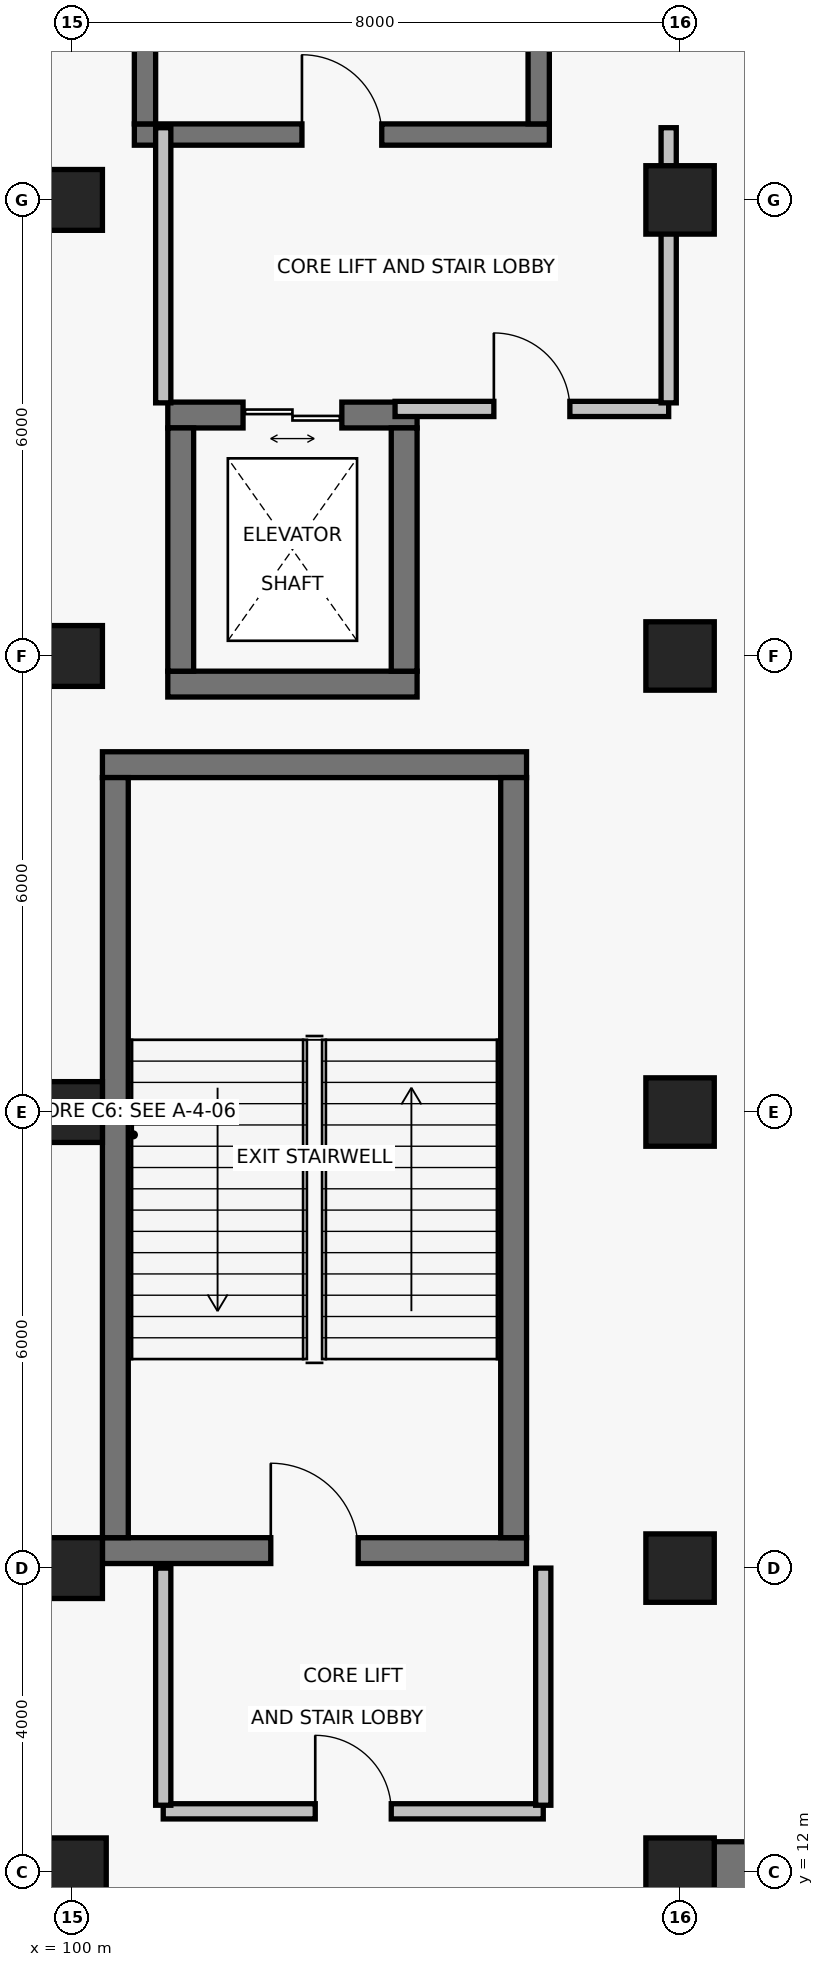
"""IFC4 building model, lengths in metres.
Left out: names, types, materials, properties, quantities, classifications, styles, units other than length and angle.
Written with IfcOpenShell. Run it as: python <this file> out.ifc"""

import sys

from ifc_helpers import new_model, si_unit, direction, frame, frame_2d, origin, origin_2d, place, context, subcontext, project, spatial, rectangle, extrude, element, fill, save


model = new_model("IFC4")
c1 = context("Model", 3, precision=1e-05, world=origin(), true_north=direction((0.0, 1.0)))
c2 = subcontext(c1, "Body", "Model", "MODEL_VIEW")
j1 = project(units=[si_unit("LENGTHUNIT", "METRE"), si_unit("PLANEANGLEUNIT", "RADIAN")], contexts=[c1])
p1 = place(None, origin())
s1 = spatial("IfcSite", under=j1, at=p1, CompositionType="ELEMENT")
p2 = place(p1, origin())
s2 = spatial("IfcBuilding", under=s1, at=p2, CompositionType="ELEMENT")
p3 = place(p2, frame((0.0, 0.0, -10.4)))
s3 = spatial("IfcBuildingStorey", under=s2, at=p3, CompositionType="ELEMENT", Elevation=-10.4)
p4 = place(p3, frame((100.0, 12.0, 0.0), z_axis=(0.0, 0.0, 1.0), x_axis=(1.0, 0.0, 0.0)))
e1 = element("IfcColumn", 1, at=p4, inside=s3, PredefinedType="COLUMN", context=c2, shape_type="SweptSolid", body=[
    extrude(rectangle(XDim=0.9, YDim=0.9, at=origin_2d()), origin(), (0.0, 0.0, 1.0), 5.6),
])
for number, where, z_axis, x_axis in (
    (2, (100.0, 16.0, 0.0), (0.0, 0.0, 1.0), (1.0, 0.0, 0.0)),
    (3, (100.0, 22.0, 0.0), (0.0, 0.0, 1.0), (1.0, 0.0, 0.0)),
    (4, (100.0, 28.0, 0.0), (0.0, 0.0, 1.0), (1.0, 0.0, 0.0)),
    (5, (100.0, 34.0, 0.0), (0.0, 0.0, 1.0), (1.0, 0.0, 0.0)),
):
    element("IfcColumn", number, at=place(p3, frame(where, z_axis=z_axis, x_axis=x_axis)), inside=s3, PredefinedType="COLUMN", context=c2, shape_type="SweptSolid", body=[
        extrude(rectangle(XDim=0.8, YDim=0.8, at=origin_2d()), origin(), (0.0, 0.0, 1.0), 5.6),
    ])
for number, where, z_axis, x_axis in (
    (6, (108.0, 12.0, 0.0), (0.0, 0.0, 1.0), (1.0, 0.0, 0.0)),
    (7, (108.0, 16.0, 0.0), (0.0, 0.0, 1.0), (1.0, 0.0, 0.0)),
    (8, (108.0, 22.0, 0.0), (0.0, 0.0, 1.0), (1.0, 0.0, 0.0)),
    (9, (108.0, 28.0, 0.0), (0.0, 0.0, 1.0), (1.0, 0.0, 0.0)),
    (10, (108.0, 34.0, 0.0), (0.0, 0.0, 1.0), (1.0, 0.0, 0.0)),
):
    element("IfcColumn", number, at=place(p3, frame(where, z_axis=z_axis, x_axis=x_axis)), inside=s3, PredefinedType="COLUMN", context=c2, shape_type="SweptSolid", body=[
        extrude(rectangle(XDim=0.9, YDim=0.9, at=origin_2d()), origin(), (0.0, 0.0, 1.0), 5.6),
    ])
p5 = place(p3, frame((108.0, 0.0, 0.0), z_axis=(0.0, 0.0, 1.0), x_axis=(0.0, 1.0, 0.0)))
e11 = element("IfcWall", 11, at=p5, inside=s3, PredefinedType="USERDEFINED", context=c2, shape_type="SweptSolid", body=[
    extrude(rectangle(XDim=12.0, YDim=0.8, at=frame_2d((6.0, 0.0))), origin(), (0.0, 0.0, 1.0), 5.15),
])
p6 = place(p3, frame((108.0, 12.0, 0.0), z_axis=(0.0, 0.0, 1.0), x_axis=(1.0, 0.0, 0.0)))
e12 = element("IfcWall", 12, at=p6, inside=s3, PredefinedType="USERDEFINED", context=c2, shape_type="SweptSolid", body=[
    extrude(rectangle(XDim=30.0, YDim=0.8, at=frame_2d((15.0, 0.0))), origin(), (0.0, 0.0, 1.0), 5.15),
])
p7 = place(p3, frame((100.4, 16.23, 0.0), z_axis=(0.0, 0.0, 1.0), x_axis=(1.0, 0.0, 0.0)))
e13 = element("IfcWall", 13, at=p7, inside=s3, PredefinedType="SHEAR", context=c2, shape_type="SweptSolid", body=[
    extrude(rectangle(XDim=5.58, YDim=0.34, at=frame_2d((2.79, 0.0))), origin(), (0.0, 0.0, 1.0), 5.15),
])
p8 = place(p7, frame((2.215, 0.0, 0.0)))
e14 = element("IfcOpeningElement", 14, at=p8, cuts=e13, PredefinedType="OPENING", context=c2, shape_type="SweptSolid", body=[
    extrude(rectangle(XDim=1.15, YDim=2.15, at=frame_2d((0.575, 1.075))), frame((0.0, 0.185, 0.0), z_axis=(0.0, -1.0, 0.0), x_axis=(1.0, 0.0, 0.0)), (0.0, 0.0, 1.0), 0.37),
])
p9 = place(p3, frame((105.98, 26.57, 0.0), z_axis=(0.0, 0.0, 1.0), x_axis=(-1.0, 0.0, 0.0)))
e15 = element("IfcWall", 15, at=p9, inside=s3, PredefinedType="SHEAR", context=c2, shape_type="SweptSolid", body=[
    extrude(rectangle(XDim=5.58, YDim=0.34, at=frame_2d((2.79, 0.0))), origin(), (0.0, 0.0, 1.0), 5.15),
])
for number, where, z_axis, x_axis in (
    (16, (100.57, 26.4, 0.0), (0.0, 0.0, 1.0), (0.0, -1.0, 0.0)),
    (17, (105.81, 16.4, 0.0), (0.0, 0.0, 1.0), (0.0, 1.0, 0.0)),
):
    element("IfcWall", number, at=place(p3, frame(where, z_axis=z_axis, x_axis=x_axis)), inside=s3, PredefinedType="SHEAR", context=c2, shape_type="SweptSolid", body=[
        extrude(rectangle(XDim=10.0, YDim=0.34, at=frame_2d((5.0, 0.0))), origin(), (0.0, 0.0, 1.0), 5.15),
    ])
p10 = place(p3, frame((101.2, 12.8, 0.0), z_axis=(0.0, 0.0, 1.0), x_axis=(1.0, 0.0, 0.0)))
e18 = element("IfcWall", 18, at=p10, inside=s3, PredefinedType="PARTITIONING", context=c2, shape_type="SweptSolid", body=[
    extrude(rectangle(XDim=5.0, YDim=0.2, at=frame_2d((2.5, 0.0))), origin(), (0.0, 0.0, 1.0), 4.883),
])
p11 = place(p10, frame((2.0, 0.0, 0.0)))
e19 = element("IfcOpeningElement", 19, at=p11, cuts=e18, PredefinedType="OPENING", context=c2, shape_type="SweptSolid", body=[
    extrude(rectangle(XDim=1.0, YDim=2.15, at=frame_2d((0.5, 1.075))), frame((0.0, 0.115, 0.0), z_axis=(0.0, -1.0, 0.0), x_axis=(1.0, 0.0, 0.0)), (0.0, 0.0, 1.0), 0.23),
])
for number, where, z_axis, x_axis in (
    (20, (101.2, 16.0, 0.0), (0.0, 0.0, 1.0), (0.0, -1.0, 0.0)),
    (21, (106.2, 12.88, 0.0), (0.0, 0.0, 1.0), (0.0, 1.0, 0.0)),
):
    element("IfcWall", number, at=place(p3, frame(where, z_axis=z_axis, x_axis=x_axis)), inside=s3, PredefinedType="PARTITIONING", context=c2, shape_type="SweptSolid", body=[
        extrude(rectangle(XDim=3.12, YDim=0.2, at=frame_2d((1.56, 0.0))), origin(), (0.0, 0.0, 1.0), 4.48),
    ])
p12 = place(p3, frame((100.82, 34.86, 0.0), z_axis=(0.0, 0.0, 1.0), x_axis=(1.0, 0.0, 0.0)))
e22 = element("IfcWall", 22, at=p12, inside=s3, PredefinedType="SHEAR", context=c2, shape_type="SweptSolid", body=[
    extrude(rectangle(XDim=5.46, YDim=0.28, at=frame_2d((2.73, 0.0))), origin(), (0.0, 0.0, 1.0), 5.15),
])
p13 = place(p12, frame((2.205, 0.0, 0.0)))
e23 = element("IfcOpeningElement", 23, at=p13, cuts=e22, PredefinedType="OPENING", context=c2, shape_type="SweptSolid", body=[
    extrude(rectangle(XDim=1.05, YDim=2.15, at=frame_2d((0.525, 1.075))), frame((0.0, 0.155, 0.0), z_axis=(0.0, -1.0, 0.0), x_axis=(1.0, 0.0, 0.0)), (0.0, 0.0, 1.0), 0.31),
])
for number, where, z_axis, x_axis in (
    (24, (100.96, 45.0, 0.0), (0.0, 0.0, 1.0), (0.0, -1.0, 0.0)),
    (25, (106.14, 35.0, 0.0), (0.0, 0.0, 1.0), (0.0, 1.0, 0.0)),
):
    element("IfcWall", number, at=place(p3, frame(where, z_axis=z_axis, x_axis=x_axis)), inside=s3, PredefinedType="SHEAR", context=c2, shape_type="SweptSolid", body=[
        extrude(rectangle(XDim=10.0, YDim=0.28, at=frame_2d((5.0, 0.0))), origin(), (0.0, 0.0, 1.0), 5.15),
    ])
p14 = place(p3, frame((101.26, 27.63, 0.0), z_axis=(0.0, 0.0, 1.0), x_axis=(1.0, 0.0, 0.0)))
e26 = element("IfcWall", 26, at=p14, inside=s3, PredefinedType="SHEAR", context=c2, shape_type="SweptSolid", body=[
    extrude(rectangle(XDim=3.28, YDim=0.34, at=frame_2d((1.64, 0.0))), origin(), (0.0, 0.0, 1.0), 5.15),
])
p15 = place(p3, frame((104.54, 31.17, 0.0), z_axis=(0.0, 0.0, 1.0), x_axis=(-1.0, 0.0, 0.0)))
e27 = element("IfcWall", 27, at=p15, inside=s3, PredefinedType="SHEAR", context=c2, shape_type="SweptSolid", body=[
    extrude(rectangle(XDim=3.28, YDim=0.34, at=frame_2d((1.64, 0.0))), origin(), (0.0, 0.0, 1.0), 5.15),
])
p16 = place(p15, frame((0.99, 0.0, 0.0)))
e28 = element("IfcOpeningElement", 28, at=p16, cuts=e27, PredefinedType="OPENING", context=c2, shape_type="SweptSolid", body=[
    extrude(rectangle(XDim=1.3, YDim=2.25, at=frame_2d((0.65, 1.125))), frame((0.0, 0.185, 0.0), z_axis=(0.0, -1.0, 0.0), x_axis=(1.0, 0.0, 0.0)), (0.0, 0.0, 1.0), 0.37),
])
for number, where, z_axis, x_axis in (
    (29, (101.43, 31.0, 0.0), (0.0, 0.0, 1.0), (0.0, -1.0, 0.0)),
    (30, (104.37, 27.8, 0.0), (0.0, 0.0, 1.0), (0.0, 1.0, 0.0)),
):
    element("IfcWall", number, at=place(p3, frame(where, z_axis=z_axis, x_axis=x_axis)), inside=s3, PredefinedType="SHEAR", context=c2, shape_type="SweptSolid", body=[
        extrude(rectangle(XDim=3.2, YDim=0.34, at=frame_2d((1.6, 0.0))), origin(), (0.0, 0.0, 1.0), 5.15),
    ])
p17 = place(p3, frame((104.25, 31.25, 0.0), z_axis=(0.0, 0.0, 1.0), x_axis=(1.0, 0.0, 0.0)))
e31 = element("IfcWall", 31, at=p17, inside=s3, PredefinedType="PARTITIONING", context=c2, shape_type="SweptSolid", body=[
    extrude(rectangle(XDim=3.6, YDim=0.2, at=frame_2d((1.8, 0.0))), origin(), (0.0, 0.0, 1.0), 4.68),
])
p18 = place(p17, frame((1.3, 0.0, 0.0)))
e32 = element("IfcOpeningElement", 32, at=p18, cuts=e31, PredefinedType="OPENING", context=c2, shape_type="SweptSolid", body=[
    extrude(rectangle(XDim=1.0, YDim=2.15, at=frame_2d((0.5, 1.075))), frame((0.0, 0.115, 0.0), z_axis=(0.0, -1.0, 0.0), x_axis=(1.0, 0.0, 0.0)), (0.0, 0.0, 1.0), 0.23),
])
for number, where, z_axis, x_axis in (
    (33, (101.2, 34.95, 0.0), (0.0, 0.0, 1.0), (0.0, -1.0, 0.0)),
    (34, (107.85, 31.33, 0.0), (0.0, 0.0, 1.0), (0.0, 1.0, 0.0)),
):
    element("IfcWall", number, at=place(p3, frame(where, z_axis=z_axis, x_axis=x_axis)), inside=s3, PredefinedType="PARTITIONING", context=c2, shape_type="SweptSolid", body=[
        extrude(rectangle(XDim=3.62, YDim=0.2, at=frame_2d((1.81, 0.0))), origin(), (0.0, 0.0, 1.0), 4.48),
    ])
p19 = place(p8, origin())
e35 = element("IfcDoor", 35, at=p19, inside=s3, OperationType="SINGLE_SWING_LEFT", PredefinedType="DOOR", context=c2, shape_type="SweptSolid", body=[
    extrude(rectangle(XDim=1.15, YDim=2.15, at=frame_2d((0.575, 1.075))), frame((0.0, 0.025, 0.0), z_axis=(0.0, -1.0, 0.0), x_axis=(1.0, 0.0, 0.0)), (0.0, 0.0, 1.0), 0.05),
])
fill(e14, e35)
p20 = place(p11, origin())
e36 = element("IfcDoor", 36, at=p20, inside=s3, OperationType="SINGLE_SWING_LEFT", PredefinedType="DOOR", context=c2, shape_type="SweptSolid", body=[
    extrude(rectangle(XDim=1.0, YDim=2.15, at=frame_2d((0.5, 1.075))), frame((0.0, 0.025, 0.0), z_axis=(0.0, -1.0, 0.0), x_axis=(1.0, 0.0, 0.0)), (0.0, 0.0, 1.0), 0.05),
])
fill(e19, e36)
p21 = place(p13, origin())
e37 = element("IfcDoor", 37, at=p21, inside=s3, OperationType="SINGLE_SWING_LEFT", PredefinedType="DOOR", context=c2, shape_type="SweptSolid", body=[
    extrude(rectangle(XDim=1.05, YDim=2.15, at=frame_2d((0.525, 1.075))), frame((0.0, 0.025, 0.0), z_axis=(0.0, -1.0, 0.0), x_axis=(1.0, 0.0, 0.0)), (0.0, 0.0, 1.0), 0.05),
])
fill(e23, e37)
p22 = place(p16, origin())
e38 = element("IfcDoor", 38, at=p22, inside=s3, OperationType="DOUBLE_DOOR_SLIDING", PredefinedType="DOOR", context=c2, shape_type="SweptSolid", body=[
    extrude(rectangle(XDim=1.3, YDim=2.25, at=frame_2d((0.65, 1.125))), frame((0.0, 0.025, 0.0), z_axis=(0.0, -1.0, 0.0), x_axis=(1.0, 0.0, 0.0)), (0.0, 0.0, 1.0), 0.05),
])
fill(e28, e38)
p23 = place(p18, origin())
e39 = element("IfcDoor", 39, at=p23, inside=s3, OperationType="SINGLE_SWING_LEFT", PredefinedType="DOOR", context=c2, shape_type="SweptSolid", body=[
    extrude(rectangle(XDim=1.0, YDim=2.15, at=frame_2d((0.5, 1.075))), frame((0.0, 0.025, 0.0), z_axis=(0.0, -1.0, 0.0), x_axis=(1.0, 0.0, 0.0)), (0.0, 0.0, 1.0), 0.05),
])
fill(e32, e39)
save(model, sys.argv[1])
